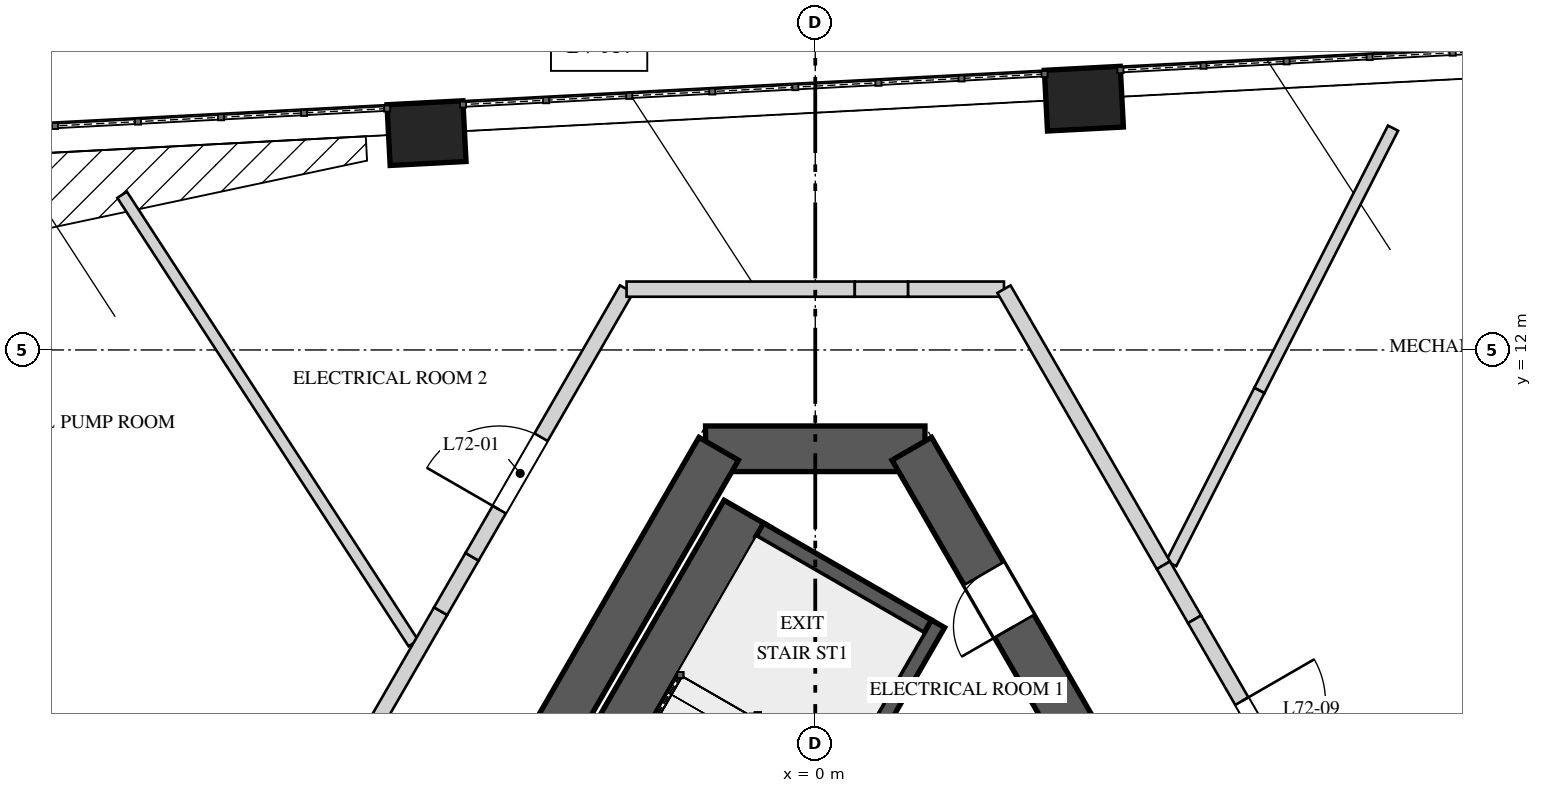
"""IFC4 building model, lengths in metres.
Left out: names, types, materials, properties, quantities, classifications, styles, units other than length and angle.
Written with IfcOpenShell. Run it as: python <this file> out.ifc"""

import sys

from ifc_helpers import new_model, si_unit, direction, frame, frame_2d, origin, origin_2d, place, context, subcontext, project, spatial, rectangle, extrude, element, fill, save


model = new_model("IFC4")
c1 = context("Model", 3, precision=1e-05, world=origin(), true_north=direction((0.0, 1.0)))
c2 = subcontext(c1, "Body", "Model", "MODEL_VIEW")
j1 = project(units=[si_unit("LENGTHUNIT", "METRE"), si_unit("PLANEANGLEUNIT", "RADIAN")], contexts=[c1])
p1 = place(None, origin())
s1 = spatial("IfcSite", under=j1, at=p1, CompositionType="ELEMENT")
p2 = place(p1, origin())
s2 = spatial("IfcBuilding", under=s1, at=p2, CompositionType="ELEMENT")
p3 = place(p2, frame((0.0, 0.0, 306.4)))
s3 = spatial("IfcBuildingStorey", under=s2, at=p3, CompositionType="ELEMENT", Elevation=306.4)
p4 = place(p3, frame((1.443, 10.7, 0.0), z_axis=(0.0, 0.0, 1.0), x_axis=(-1.0, 0.0, 0.0)))
e1 = element("IfcWall", 1, at=p4, inside=s3, PredefinedType="SHEAR", context=c2, shape_type="SweptSolid", body=[
    extrude(rectangle(XDim=2.887, YDim=0.6, at=frame_2d((1.443, 0.0))), origin(), (0.0, 0.0, 1.0), 14.0),
])
p5 = place(p3, frame((-1.27, 10.7, 0.0), z_axis=(0.0, 0.0, 1.0), x_axis=(-0.499999536116, -0.866025671608, 0.0)))
e2 = element("IfcWall", 2, at=p5, inside=s3, PredefinedType="SHEAR", context=c2, shape_type="SweptSolid", body=[
    extrude(rectangle(XDim=17.263, YDim=0.6, at=frame_2d((8.631, 0.0))), origin(), (0.0, 0.0, 1.0), 14.0),
])
p6 = place(p5, frame((6.836, 0.0, 0.0)))
e3 = element("IfcOpeningElement", 3, at=p6, cuts=e2, PredefinedType="OPENING", context=c2, shape_type="SweptSolid", body=[
    extrude(rectangle(XDim=1.0, YDim=2.4, at=frame_2d((0.5, 1.2))), frame((0.0, 0.31, 0.0), z_axis=(0.0, -1.0, 0.0), x_axis=(1.0, 0.0, 0.0)), (0.0, 0.0, 1.0), 0.62),
])
p7 = place(p3, frame((9.902, -4.25, 0.0), z_axis=(0.0, 0.0, 1.0), x_axis=(-0.499999536116, 0.866025671608, 0.0)))
e4 = element("IfcWall", 4, at=p7, inside=s3, PredefinedType="SHEAR", context=c2, shape_type="SweptSolid", body=[
    extrude(rectangle(XDim=17.263, YDim=0.6, at=frame_2d((8.631, 0.0))), origin(), (0.0, 0.0, 1.0), 14.0),
])
p8 = place(p7, frame((6.906, 0.0, 0.0)))
e5 = element("IfcOpeningElement", 5, at=p8, cuts=e4, PredefinedType="OPENING", context=c2, shape_type="SweptSolid", body=[
    extrude(rectangle(XDim=1.0, YDim=2.4, at=frame_2d((0.5, 1.2))), frame((0.0, 0.31, 0.0), z_axis=(0.0, -1.0, 0.0), x_axis=(1.0, 0.0, 0.0)), (0.0, 0.0, 1.0), 0.62),
])
p9 = place(p7, frame((14.567, 0.0, 0.0)))
e6 = element("IfcOpeningElement", 6, at=p9, cuts=e4, PredefinedType="OPENING", context=c2, shape_type="SweptSolid", body=[
    extrude(rectangle(XDim=0.8, YDim=2.1, at=frame_2d((0.4, 1.05))), frame((0.0, 0.31, 0.0), z_axis=(0.0, -1.0, 0.0), x_axis=(1.0, 0.0, 0.0)), (0.0, 0.0, 1.0), 0.62),
])
for number, where, z_axis, x_axis in (
    (7, (3.534, 15.306, 0.0), (0.0, 0.0, 1.0), (-0.999, -0.052, 0.0)),
    (8, (-5.115, 14.853, 0.0), (0.0, 0.0, 1.0), (-0.999, -0.052, 0.0)),
):
    element("IfcColumn", number, at=place(p3, frame(where, z_axis=z_axis, x_axis=x_axis)), inside=s3, PredefinedType="COLUMN", context=c2, shape_type="SweptSolid", body=[
        extrude(rectangle(XDim=1.0, YDim=0.8, at=origin_2d()), origin(), (0.0, 0.0, 1.0), 9.037),
    ])
p10 = place(p3, frame((-0.896, 9.847, 0.0), z_axis=(0.0, 0.0, 1.0), x_axis=(-0.500009909098, -0.866019682689, 0.0)))
e9 = element("IfcWall", 9, at=p10, inside=s3, PredefinedType="SOLIDWALL", context=c2, shape_type="SweptSolid", body=[
    extrude(rectangle(XDim=6.2, YDim=0.7, at=frame_2d((3.1, 0.0))), origin(), (0.0, 0.0, 1.0), 13.65),
])
p11 = place(p3, frame((1.615, 8.397, 0.0), z_axis=(0.0, 0.0, 1.0), x_axis=(-0.500009909098, -0.866019682689, 0.0)))
e10 = element("IfcWall", 10, at=p11, inside=s3, PredefinedType="SOLIDWALL", context=c2, shape_type="SweptSolid", body=[
    extrude(rectangle(XDim=6.2, YDim=0.2, at=frame_2d((3.1, 0.0))), origin(), (0.0, 0.0, 1.0), 13.65),
])
p12 = place(p3, frame((1.479, 8.361, 0.0), z_axis=(0.0, 0.0, 1.0), x_axis=(-0.865989465428, 0.500062241894, 0.0)))
e11 = element("IfcWall", 11, at=p12, inside=s3, PredefinedType="SOLIDWALL", context=c2, shape_type="SweptSolid", body=[
    extrude(rectangle(XDim=2.55, YDim=0.2, at=frame_2d((1.275, 0.0))), origin(), (0.0, 0.0, 1.0), 13.65),
])
p13 = place(p3, frame((-7.718, 3.932, 0.0), z_axis=(0.0, 0.0, 1.0), x_axis=(-0.891006469539, 0.453990606995, 0.0)))
e12 = element("IfcWall", 12, at=p13, inside=s3, PredefinedType="PARTITIONING", context=c2, shape_type="SweptSolid", body=[
    extrude(rectangle(XDim=8.011, YDim=0.15, at=frame_2d((4.005, 0.0))), origin(), (0.0, 0.0, 1.0), 13.65),
])
p14 = place(p3, frame((-5.287, 8.142, 0.0), z_axis=(0.0, 0.0, 1.0), x_axis=(-0.544633340221, 0.83867426616, 0.0)))
e13 = element("IfcWall", 13, at=p14, inside=s3, PredefinedType="PARTITIONING", context=c2, shape_type="SweptSolid", body=[
    extrude(rectangle(XDim=7.035, YDim=0.15, at=frame_2d((3.518, 0.0))), origin(), (0.0, 0.0, 1.0), 13.65),
])
p15 = place(p3, frame((7.264, 4.718, 0.0), z_axis=(0.0, 0.0, 1.0), x_axis=(0.838671229972, 0.544638015583, 0.0)))
e14 = element("IfcWall", 14, at=p15, inside=s3, PredefinedType="PARTITIONING", context=c2, shape_type="SweptSolid", body=[
    extrude(rectangle(XDim=8.011, YDim=0.15, at=frame_2d((4.005, 0.0))), origin(), (0.0, 0.0, 1.0), 13.65),
])
p16 = place(p3, frame((7.601, 14.918, 0.0), z_axis=(0.0, 0.0, 1.0), x_axis=(-0.454033423959, -0.890984651904, 0.0)))
e15 = element("IfcWall", 15, at=p16, inside=s3, PredefinedType="PARTITIONING", context=c2, shape_type="SweptSolid", body=[
    extrude(rectangle(XDim=3.873, YDim=0.15, at=frame_2d((1.937, 0.0))), origin(), (0.0, 0.0, 1.0), 13.65),
])
p17 = place(p3, frame((5.843, 11.467, 0.0), z_axis=(0.0, 0.0, 1.0), x_axis=(-0.454001617185, -0.891000859479, 0.0)))
e16 = element("IfcWall", 16, at=p17, inside=s3, PredefinedType="PARTITIONING", context=c2, shape_type="SweptSolid", body=[
    extrude(rectangle(XDim=2.556, YDim=0.15, at=frame_2d((1.278, 0.0))), origin(), (0.0, 0.0, 1.0), 12.95),
])
p18 = place(p3, frame((-6.116, 6.507, 0.0), z_axis=(0.0, 0.0, 1.0), x_axis=(0.499998356159, 0.866026352854, 0.0)))
e17 = element("IfcWall", 17, at=p18, inside=s3, PredefinedType="SOLIDWALL", context=c2, shape_type="SweptSolid", body=[
    extrude(rectangle(XDim=2.375, YDim=0.2, at=frame_2d((1.187, 0.0))), origin(), (0.0, 0.0, 1.0), 13.65),
])
p19 = place(p3, frame((-4.929, 8.563, 0.0), z_axis=(0.0, 0.0, 1.0), x_axis=(0.500046299512, 0.865998671098, 0.0)))
e18 = element("IfcWall", 18, at=p19, inside=s3, PredefinedType="SOLIDWALL", context=c2, shape_type="SweptSolid", body=[
    extrude(rectangle(XDim=0.827, YDim=0.2, at=frame_2d((0.413, 0.0))), origin(), (0.0, 0.0, 1.0), 12.95),
])
p20 = place(p3, frame((-4.515, 9.279, 0.0), z_axis=(0.0, 0.0, 1.0), x_axis=(0.499975428181, 0.866039589866, 0.0)))
e19 = element("IfcWall", 19, at=p20, inside=s3, PredefinedType="SOLIDWALL", context=c2, shape_type="SweptSolid", body=[
    extrude(rectangle(XDim=4.066, YDim=0.2, at=frame_2d((2.033, 0.0))), origin(), (0.0, 0.0, 1.0), 13.65),
])
p21 = place(p20, frame((0.717, 0.0, 0.0)))
e20 = element("IfcOpeningElement", 20, at=p21, cuts=e19, PredefinedType="OPENING", context=c2, shape_type="SweptSolid", body=[
    extrude(rectangle(XDim=1.1, YDim=2.2, at=frame_2d((0.55, 1.1))), frame((0.0, 0.11, 0.0), z_axis=(0.0, -1.0, 0.0), x_axis=(1.0, 0.0, 0.0)), (0.0, 0.0, 1.0), 0.22),
])
p22 = place(p3, frame((-2.483, 12.8, 0.0), z_axis=(0.0, 0.0, 1.0), x_axis=(1.0, 0.0, 0.0)))
e21 = element("IfcWall", 21, at=p22, inside=s3, PredefinedType="SOLIDWALL", context=c2, shape_type="SweptSolid", body=[
    extrude(rectangle(XDim=3.003, YDim=0.2, at=frame_2d((1.501, 0.0))), origin(), (0.0, 0.0, 1.0), 13.65),
])
p23 = place(p3, frame((0.52, 12.8, 0.0), z_axis=(0.0, 0.0, 1.0), x_axis=(1.0, 0.0, 0.0)))
e22 = element("IfcWall", 22, at=p23, inside=s3, PredefinedType="SOLIDWALL", context=c2, shape_type="SweptSolid", body=[
    extrude(rectangle(XDim=0.701, YDim=0.2, at=frame_2d((0.351, 0.0))), origin(), (0.0, 0.0, 1.0), 12.95),
])
p24 = place(p3, frame((1.222, 12.8, 0.0), z_axis=(0.0, 0.0, 1.0), x_axis=(1.0, 0.0, 0.0)))
e23 = element("IfcWall", 23, at=p24, inside=s3, PredefinedType="SOLIDWALL", context=c2, shape_type="SweptSolid", body=[
    extrude(rectangle(XDim=1.261, YDim=0.2, at=frame_2d((0.63, 0.0))), origin(), (0.0, 0.0, 1.0), 13.65),
])
p25 = place(p3, frame((2.483, 12.8, 0.0), z_axis=(0.0, 0.0, 1.0), x_axis=(0.499982771656, -0.866035350345, 0.0)))
e24 = element("IfcWall", 24, at=p25, inside=s3, PredefinedType="SOLIDWALL", context=c2, shape_type="SweptSolid", body=[
    extrude(rectangle(XDim=4.195, YDim=0.2, at=frame_2d((2.097, 0.0))), origin(), (0.0, 0.0, 1.0), 13.65),
])
p26 = place(p3, frame((4.58, 9.167, 0.0), z_axis=(0.0, 0.0, 1.0), x_axis=(0.499945576647, -0.866056822842, 0.0)))
e25 = element("IfcWall", 25, at=p26, inside=s3, PredefinedType="SOLIDWALL", context=c2, shape_type="SweptSolid", body=[
    extrude(rectangle(XDim=0.821, YDim=0.2, at=frame_2d((0.41, 0.0))), origin(), (0.0, 0.0, 1.0), 12.95),
])
p27 = place(p3, frame((4.99, 8.457, 0.0), z_axis=(0.0, 0.0, 1.0), x_axis=(0.500004219487, -0.866022967649, 0.0)))
e26 = element("IfcWall", 26, at=p27, inside=s3, PredefinedType="SOLIDWALL", context=c2, shape_type="SweptSolid", body=[
    extrude(rectangle(XDim=5.55, YDim=0.2, at=frame_2d((2.775, 0.0))), origin(), (0.0, 0.0, 1.0), 13.65),
])
p28 = place(p27, frame((1.243, 0.0, 0.0)))
e27 = element("IfcOpeningElement", 27, at=p28, cuts=e26, PredefinedType="OPENING", context=c2, shape_type="SweptSolid", body=[
    extrude(rectangle(XDim=1.1, YDim=2.2, at=frame_2d((0.55, 1.1))), frame((0.0, 0.11, 0.0), z_axis=(0.0, -1.0, 0.0), x_axis=(1.0, 0.0, 0.0)), (0.0, 0.0, 1.0), 0.22),
])
p29 = place(p9, origin())
e28 = element("IfcDoor", 28, at=p29, inside=s3, OperationType="SINGLE_SWING_RIGHT", PredefinedType="DOOR", context=c2, shape_type="SweptSolid", body=[
    extrude(rectangle(XDim=0.8, YDim=2.1, at=frame_2d((0.4, 1.05))), frame((0.0, 0.025, 0.0), z_axis=(0.0, -1.0, 0.0), x_axis=(1.0, 0.0, 0.0)), (0.0, 0.0, 1.0), 0.05),
])
fill(e6, e28)
p30 = place(p21, origin())
e29 = element("IfcDoor", 29, at=p30, inside=s3, OperationType="SINGLE_SWING_LEFT", PredefinedType="DOOR", context=c2, shape_type="SweptSolid", body=[
    extrude(rectangle(XDim=1.1, YDim=2.2, at=frame_2d((0.55, 1.1))), frame((0.0, 0.025, 0.0), z_axis=(0.0, -1.0, 0.0), x_axis=(1.0, 0.0, 0.0)), (0.0, 0.0, 1.0), 0.05),
])
fill(e20, e29)
p31 = place(p28, origin())
e30 = element("IfcDoor", 30, at=p31, inside=s3, OperationType="SINGLE_SWING_LEFT", PredefinedType="DOOR", context=c2, shape_type="SweptSolid", body=[
    extrude(rectangle(XDim=1.1, YDim=2.2, at=frame_2d((0.55, 1.1))), frame((0.0, 0.025, 0.0), z_axis=(0.0, -1.0, 0.0), x_axis=(1.0, 0.0, 0.0)), (0.0, 0.0, 1.0), 0.05),
])
fill(e27, e30)
save(model, sys.argv[1])
